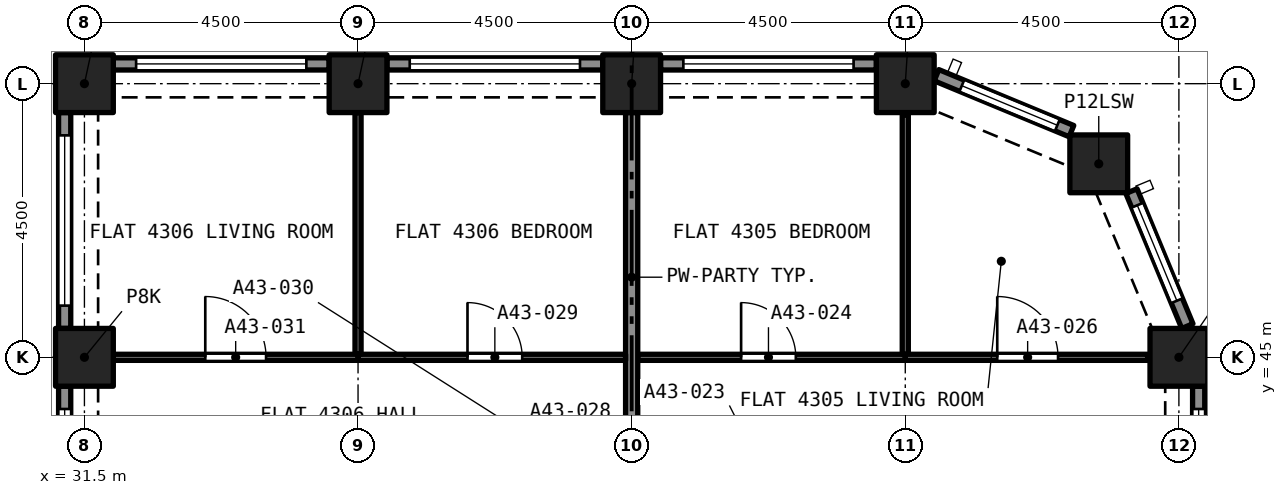
"""IFC4 building model, lengths in metres.
Left out: names, types, materials, properties, quantities, classifications, styles, units other than length and angle.
Written with IfcOpenShell. Run it as: python <this file> out.ifc"""

import sys

from ifc_helpers import new_model, si_unit, direction, frame, frame_2d, origin, origin_2d, place, context, subcontext, project, spatial, rectangle, extrude, element, fill, save


model = new_model("IFC4")
c1 = context("Model", 3, precision=1e-05, world=origin(), true_north=direction((0.0, 1.0)))
c2 = subcontext(c1, "Body", "Model", "MODEL_VIEW")
j1 = project(units=[si_unit("LENGTHUNIT", "METRE"), si_unit("PLANEANGLEUNIT", "RADIAN")], contexts=[c1])
p1 = place(None, origin())
s1 = spatial("IfcSite", under=j1, at=p1, CompositionType="ELEMENT")
p2 = place(p1, origin())
s2 = spatial("IfcBuilding", under=s1, at=p2, CompositionType="ELEMENT")
p3 = place(p2, frame((0.0, 0.0, 155.0)))
s3 = spatial("IfcBuildingStorey", under=s2, at=p3, CompositionType="ELEMENT", Elevation=155.0)
for number, where, z_axis, x_axis in (
    (1, (31.5, 45.0, 0.0), (0.0, 0.0, 1.0), (1.0, 0.0, 0.0)),
    (2, (49.5, 45.0, 0.0), (0.0, 0.0, 1.0), (1.0, 0.0, 0.0)),
    (3, (48.182, 48.182, 0.0), (0.0, 0.0, 1.0), (1.0, 0.0, 0.0)),
    (4, (31.5, 49.5, 0.0), (0.0, 0.0, 1.0), (1.0, 0.0, 0.0)),
    (5, (36.0, 49.5, 0.0), (0.0, 0.0, 1.0), (1.0, 0.0, 0.0)),
    (6, (40.5, 49.5, 0.0), (0.0, 0.0, 1.0), (1.0, 0.0, 0.0)),
    (7, (45.0, 49.5, 0.0), (0.0, 0.0, 1.0), (1.0, 0.0, 0.0)),
):
    element("IfcColumn", number, at=place(p3, frame(where, z_axis=z_axis, x_axis=x_axis)), inside=s3, PredefinedType="COLUMN", context=c2, shape_type="SweptSolid", body=[
        extrude(rectangle(XDim=0.95, YDim=0.95, at=origin_2d()), origin(), (0.0, 0.0, 1.0), 4.4),
    ])
p4 = place(p3, frame((49.825, 44.525, 0.0), z_axis=(0.0, 0.0, 1.0), x_axis=(0.0, -1.0, 0.0)))
e8 = element("IfcWall", 8, at=p4, inside=s3, PredefinedType="SOLIDWALL", context=c2, shape_type="SweptSolid", body=[
    extrude(rectangle(XDim=3.55, YDim=0.2, at=frame_2d((1.775, 0.0))), origin(), (0.0, 0.0, 1.0), 4.4),
])
p5 = place(p4, frame((0.375, 0.0, 0.45)))
e9 = element("IfcOpeningElement", 9, at=p5, cuts=e8, PredefinedType="OPENING", context=c2, shape_type="SweptSolid", body=[
    extrude(rectangle(XDim=2.8, YDim=2.55, at=frame_2d((1.4, 1.275))), frame((0.0, 0.11, 0.0), z_axis=(0.0, -1.0, 0.0), x_axis=(1.0, 0.0, 0.0)), (0.0, 0.0, 1.0), 0.22),
])
p6 = place(p3, frame((48.72, 47.733, 0.0), z_axis=(0.0, 0.0, 1.0), x_axis=(0.382680855588, -0.923880599843, 0.0)))
e10 = element("IfcWall", 10, at=p6, inside=s3, PredefinedType="SOLIDWALL", context=c2, shape_type="SweptSolid", body=[
    extrude(rectangle(XDim=2.403, YDim=0.2, at=frame_2d((1.201, 0.0))), origin(), (0.0, 0.0, 1.0), 4.4),
])
p7 = place(p6, frame((0.251, 0.0, 0.45)))
e11 = element("IfcOpeningElement", 11, at=p7, cuts=e10, PredefinedType="OPENING", context=c2, shape_type="SweptSolid", body=[
    extrude(rectangle(XDim=1.7, YDim=2.55, at=frame_2d((0.85, 1.275))), frame((0.0, 0.11, 0.0), z_axis=(0.0, -1.0, 0.0), x_axis=(1.0, 0.0, 0.0)), (0.0, 0.0, 1.0), 0.22),
])
p8 = place(p3, frame((45.513, 49.639, 0.0), z_axis=(0.0, 0.0, 1.0), x_axis=(0.923880599843, -0.382680855588, 0.0)))
e12 = element("IfcWall", 12, at=p8, inside=s3, PredefinedType="SOLIDWALL", context=c2, shape_type="SweptSolid", body=[
    extrude(rectangle(XDim=2.403, YDim=0.2, at=frame_2d((1.201, 0.0))), origin(), (0.0, 0.0, 1.0), 4.4),
])
p9 = place(p8, frame((0.451, 0.0, 0.45)))
e13 = element("IfcOpeningElement", 13, at=p9, cuts=e12, PredefinedType="OPENING", context=c2, shape_type="SweptSolid", body=[
    extrude(rectangle(XDim=1.7, YDim=2.55, at=frame_2d((0.85, 1.275))), frame((0.0, 0.11, 0.0), z_axis=(0.0, -1.0, 0.0), x_axis=(1.0, 0.0, 0.0)), (0.0, 0.0, 1.0), 0.22),
])
p10 = place(p3, frame((40.975, 49.825, 0.0), z_axis=(0.0, 0.0, 1.0), x_axis=(1.0, 0.0, 0.0)))
e14 = element("IfcWall", 14, at=p10, inside=s3, PredefinedType="SOLIDWALL", context=c2, shape_type="SweptSolid", body=[
    extrude(rectangle(XDim=3.55, YDim=0.2, at=frame_2d((1.775, 0.0))), origin(), (0.0, 0.0, 1.0), 4.4),
])
p11 = place(p10, frame((0.375, 0.0, 0.45)))
e15 = element("IfcOpeningElement", 15, at=p11, cuts=e14, PredefinedType="OPENING", context=c2, shape_type="SweptSolid", body=[
    extrude(rectangle(XDim=2.8, YDim=2.55, at=frame_2d((1.4, 1.275))), frame((0.0, 0.11, 0.0), z_axis=(0.0, -1.0, 0.0), x_axis=(1.0, 0.0, 0.0)), (0.0, 0.0, 1.0), 0.22),
])
p12 = place(p3, frame((36.475, 49.825, 0.0), z_axis=(0.0, 0.0, 1.0), x_axis=(1.0, 0.0, 0.0)))
e16 = element("IfcWall", 16, at=p12, inside=s3, PredefinedType="SOLIDWALL", context=c2, shape_type="SweptSolid", body=[
    extrude(rectangle(XDim=3.55, YDim=0.2, at=frame_2d((1.775, 0.0))), origin(), (0.0, 0.0, 1.0), 4.4),
])
p13 = place(p12, frame((0.375, 0.0, 0.45)))
e17 = element("IfcOpeningElement", 17, at=p13, cuts=e16, PredefinedType="OPENING", context=c2, shape_type="SweptSolid", body=[
    extrude(rectangle(XDim=2.8, YDim=2.55, at=frame_2d((1.4, 1.275))), frame((0.0, 0.11, 0.0), z_axis=(0.0, -1.0, 0.0), x_axis=(1.0, 0.0, 0.0)), (0.0, 0.0, 1.0), 0.22),
])
p14 = place(p3, frame((31.975, 49.825, 0.0), z_axis=(0.0, 0.0, 1.0), x_axis=(1.0, 0.0, 0.0)))
e18 = element("IfcWall", 18, at=p14, inside=s3, PredefinedType="SOLIDWALL", context=c2, shape_type="SweptSolid", body=[
    extrude(rectangle(XDim=3.55, YDim=0.2, at=frame_2d((1.775, 0.0))), origin(), (0.0, 0.0, 1.0), 4.4),
])
p15 = place(p14, frame((0.375, 0.0, 0.45)))
e19 = element("IfcOpeningElement", 19, at=p15, cuts=e18, PredefinedType="OPENING", context=c2, shape_type="SweptSolid", body=[
    extrude(rectangle(XDim=2.8, YDim=2.55, at=frame_2d((1.4, 1.275))), frame((0.0, 0.11, 0.0), z_axis=(0.0, -1.0, 0.0), x_axis=(1.0, 0.0, 0.0)), (0.0, 0.0, 1.0), 0.22),
])
p16 = place(p3, frame((31.175, 45.475, 0.0), z_axis=(0.0, 0.0, 1.0), x_axis=(0.0, 1.0, 0.0)))
e20 = element("IfcWall", 20, at=p16, inside=s3, PredefinedType="SOLIDWALL", context=c2, shape_type="SweptSolid", body=[
    extrude(rectangle(XDim=3.55, YDim=0.2, at=frame_2d((1.775, 0.0))), origin(), (0.0, 0.0, 1.0), 4.4),
])
p17 = place(p16, frame((0.375, 0.0, 0.45)))
e21 = element("IfcOpeningElement", 21, at=p17, cuts=e20, PredefinedType="OPENING", context=c2, shape_type="SweptSolid", body=[
    extrude(rectangle(XDim=2.8, YDim=2.55, at=frame_2d((1.4, 1.275))), frame((0.0, 0.11, 0.0), z_axis=(0.0, -1.0, 0.0), x_axis=(1.0, 0.0, 0.0)), (0.0, 0.0, 1.0), 0.22),
])
p18 = place(p3, frame((31.175, 40.975, 0.0), z_axis=(0.0, 0.0, 1.0), x_axis=(0.0, 1.0, 0.0)))
e22 = element("IfcWall", 22, at=p18, inside=s3, PredefinedType="SOLIDWALL", context=c2, shape_type="SweptSolid", body=[
    extrude(rectangle(XDim=3.55, YDim=0.2, at=frame_2d((1.775, 0.0))), origin(), (0.0, 0.0, 1.0), 4.4),
])
p19 = place(p18, frame((0.375, 0.0, 0.45)))
e23 = element("IfcOpeningElement", 23, at=p19, cuts=e22, PredefinedType="OPENING", context=c2, shape_type="SweptSolid", body=[
    extrude(rectangle(XDim=2.8, YDim=2.55, at=frame_2d((1.4, 1.275))), frame((0.0, 0.11, 0.0), z_axis=(0.0, -1.0, 0.0), x_axis=(1.0, 0.0, 0.0)), (0.0, 0.0, 1.0), 0.22),
])
p20 = place(p3, frame((40.6, 45.0, 0.0), z_axis=(0.0, 0.0, 1.0), x_axis=(1.0, 0.0, 0.0)))
e24 = element("IfcWall", 24, at=p20, inside=s3, PredefinedType="PARTITIONING", context=c2, shape_type="SweptSolid", body=[
    extrude(rectangle(XDim=4.4, YDim=0.1, at=frame_2d((2.2, 0.0))), origin(), (0.0, 0.0, 1.0), 4.1),
])
p21 = place(p20, frame((1.7, 0.0, 0.0)))
e25 = element("IfcOpeningElement", 25, at=p21, cuts=e24, PredefinedType="OPENING", context=c2, shape_type="SweptSolid", body=[
    extrude(rectangle(XDim=0.9, YDim=2.1, at=frame_2d((0.45, 1.05))), frame((0.0, 0.06, 0.0), z_axis=(0.0, -1.0, 0.0), x_axis=(1.0, 0.0, 0.0)), (0.0, 0.0, 1.0), 0.12),
])
p22 = place(p3, frame((45.0, 45.05, 0.0), z_axis=(0.0, 0.0, 1.0), x_axis=(0.0, 1.0, 0.0)))
e26 = element("IfcWall", 26, at=p22, inside=s3, PredefinedType="PARTITIONING", context=c2, shape_type="SweptSolid", body=[
    extrude(rectangle(XDim=3.936, YDim=0.1, at=frame_2d((1.968, 0.0))), origin(), (0.0, 0.0, 1.0), 4.1),
])
p23 = place(p3, frame((45.0, 45.0, 0.0), z_axis=(0.0, 0.0, 1.0), x_axis=(1.0, 0.0, 0.0)))
e27 = element("IfcWall", 27, at=p23, inside=s3, PredefinedType="PARTITIONING", context=c2, shape_type="SweptSolid", body=[
    extrude(rectangle(XDim=3.986, YDim=0.1, at=frame_2d((1.993, 0.0))), origin(), (0.0, 0.0, 1.0), 4.1),
])
p24 = place(p23, frame((1.512, 0.0, 0.0)))
e28 = element("IfcOpeningElement", 28, at=p24, cuts=e27, PredefinedType="OPENING", context=c2, shape_type="SweptSolid", body=[
    extrude(rectangle(XDim=1.0, YDim=2.1, at=frame_2d((0.5, 1.05))), frame((0.0, 0.06, 0.0), z_axis=(0.0, -1.0, 0.0), x_axis=(1.0, 0.0, 0.0)), (0.0, 0.0, 1.0), 0.12),
])
p25 = place(p3, frame((40.5, 43.61, 0.0), z_axis=(0.0, 0.0, 1.0), x_axis=(0.0, 1.0, 0.0)))
e29 = element("IfcWall", 29, at=p25, inside=s3, PredefinedType="PARTITIONING", context=c2, shape_type="SweptSolid", body=[
    extrude(rectangle(XDim=5.415, YDim=0.2, at=frame_2d((2.708, 0.0))), origin(), (0.0, 0.0, 1.0), 4.1),
])
p26 = place(p3, frame((36.0, 45.0, 0.0), z_axis=(0.0, 0.0, 1.0), x_axis=(1.0, 0.0, 0.0)))
e30 = element("IfcWall", 30, at=p26, inside=s3, PredefinedType="PARTITIONING", context=c2, shape_type="SweptSolid", body=[
    extrude(rectangle(XDim=4.4, YDim=0.1, at=frame_2d((2.2, 0.0))), origin(), (0.0, 0.0, 1.0), 4.1),
])
p27 = place(p26, frame((1.8, 0.0, 0.0)))
e31 = element("IfcOpeningElement", 31, at=p27, cuts=e30, PredefinedType="OPENING", context=c2, shape_type="SweptSolid", body=[
    extrude(rectangle(XDim=0.9, YDim=2.1, at=frame_2d((0.45, 1.05))), frame((0.0, 0.06, 0.0), z_axis=(0.0, -1.0, 0.0), x_axis=(1.0, 0.0, 0.0)), (0.0, 0.0, 1.0), 0.12),
])
p28 = place(p3, frame((36.0, 45.05, 0.0), z_axis=(0.0, 0.0, 1.0), x_axis=(0.0, 1.0, 0.0)))
e32 = element("IfcWall", 32, at=p28, inside=s3, PredefinedType="PARTITIONING", context=c2, shape_type="SweptSolid", body=[
    extrude(rectangle(XDim=3.975, YDim=0.1, at=frame_2d((1.987, 0.0))), origin(), (0.0, 0.0, 1.0), 4.1),
])
p29 = place(p3, frame((31.975, 45.0, 0.0), z_axis=(0.0, 0.0, 1.0), x_axis=(1.0, 0.0, 0.0)))
e33 = element("IfcWall", 33, at=p29, inside=s3, PredefinedType="PARTITIONING", context=c2, shape_type="SweptSolid", body=[
    extrude(rectangle(XDim=4.025, YDim=0.1, at=frame_2d((2.012, 0.0))), origin(), (0.0, 0.0, 1.0), 4.1),
])
p30 = place(p29, frame((1.512, 0.0, 0.0)))
e34 = element("IfcOpeningElement", 34, at=p30, cuts=e33, PredefinedType="OPENING", context=c2, shape_type="SweptSolid", body=[
    extrude(rectangle(XDim=1.0, YDim=2.1, at=frame_2d((0.5, 1.05))), frame((0.0, 0.06, 0.0), z_axis=(0.0, -1.0, 0.0), x_axis=(1.0, 0.0, 0.0)), (0.0, 0.0, 1.0), 0.12),
])
p31 = place(p5, origin())
e35 = element("IfcWindow", 35, at=p31, inside=s3, PartitioningType="SINGLE_PANEL", PredefinedType="WINDOW", context=c2, shape_type="SweptSolid", body=[
    extrude(rectangle(XDim=2.8, YDim=2.55, at=frame_2d((1.4, 1.275))), frame((0.0, 0.03, 0.0), z_axis=(0.0, -1.0, 0.0), x_axis=(1.0, 0.0, 0.0)), (0.0, 0.0, 1.0), 0.06),
])
fill(e9, e35)
p32 = place(p7, origin())
e36 = element("IfcWindow", 36, at=p32, inside=s3, PartitioningType="SINGLE_PANEL", PredefinedType="WINDOW", context=c2, shape_type="SweptSolid", body=[
    extrude(rectangle(XDim=1.7, YDim=2.55, at=frame_2d((0.85, 1.275))), frame((0.0, 0.03, 0.0), z_axis=(0.0, -1.0, 0.0), x_axis=(1.0, 0.0, 0.0)), (0.0, 0.0, 1.0), 0.06),
])
fill(e11, e36)
p33 = place(p9, origin())
e37 = element("IfcWindow", 37, at=p33, inside=s3, PartitioningType="SINGLE_PANEL", PredefinedType="WINDOW", context=c2, shape_type="SweptSolid", body=[
    extrude(rectangle(XDim=1.7, YDim=2.55, at=frame_2d((0.85, 1.275))), frame((0.0, 0.03, 0.0), z_axis=(0.0, -1.0, 0.0), x_axis=(1.0, 0.0, 0.0)), (0.0, 0.0, 1.0), 0.06),
])
fill(e13, e37)
p34 = place(p11, origin())
e38 = element("IfcWindow", 38, at=p34, inside=s3, PartitioningType="SINGLE_PANEL", PredefinedType="WINDOW", context=c2, shape_type="SweptSolid", body=[
    extrude(rectangle(XDim=2.8, YDim=2.55, at=frame_2d((1.4, 1.275))), frame((0.0, 0.03, 0.0), z_axis=(0.0, -1.0, 0.0), x_axis=(1.0, 0.0, 0.0)), (0.0, 0.0, 1.0), 0.06),
])
fill(e15, e38)
p35 = place(p13, origin())
e39 = element("IfcWindow", 39, at=p35, inside=s3, PartitioningType="SINGLE_PANEL", PredefinedType="WINDOW", context=c2, shape_type="SweptSolid", body=[
    extrude(rectangle(XDim=2.8, YDim=2.55, at=frame_2d((1.4, 1.275))), frame((0.0, 0.03, 0.0), z_axis=(0.0, -1.0, 0.0), x_axis=(1.0, 0.0, 0.0)), (0.0, 0.0, 1.0), 0.06),
])
fill(e17, e39)
p36 = place(p15, origin())
e40 = element("IfcWindow", 40, at=p36, inside=s3, PartitioningType="SINGLE_PANEL", PredefinedType="WINDOW", context=c2, shape_type="SweptSolid", body=[
    extrude(rectangle(XDim=2.8, YDim=2.55, at=frame_2d((1.4, 1.275))), frame((0.0, 0.03, 0.0), z_axis=(0.0, -1.0, 0.0), x_axis=(1.0, 0.0, 0.0)), (0.0, 0.0, 1.0), 0.06),
])
fill(e19, e40)
p37 = place(p17, origin())
e41 = element("IfcWindow", 41, at=p37, inside=s3, PartitioningType="SINGLE_PANEL", PredefinedType="WINDOW", context=c2, shape_type="SweptSolid", body=[
    extrude(rectangle(XDim=2.8, YDim=2.55, at=frame_2d((1.4, 1.275))), frame((0.0, 0.03, 0.0), z_axis=(0.0, -1.0, 0.0), x_axis=(1.0, 0.0, 0.0)), (0.0, 0.0, 1.0), 0.06),
])
fill(e21, e41)
p38 = place(p19, origin())
e42 = element("IfcWindow", 42, at=p38, inside=s3, PartitioningType="SINGLE_PANEL", PredefinedType="WINDOW", context=c2, shape_type="SweptSolid", body=[
    extrude(rectangle(XDim=2.8, YDim=2.55, at=frame_2d((1.4, 1.275))), frame((0.0, 0.03, 0.0), z_axis=(0.0, -1.0, 0.0), x_axis=(1.0, 0.0, 0.0)), (0.0, 0.0, 1.0), 0.06),
])
fill(e23, e42)
p39 = place(p21, origin())
e43 = element("IfcDoor", 43, at=p39, inside=s3, OperationType="SINGLE_SWING_LEFT", PredefinedType="DOOR", context=c2, shape_type="SweptSolid", body=[
    extrude(rectangle(XDim=0.9, YDim=2.1, at=frame_2d((0.45, 1.05))), frame((0.0, 0.025, 0.0), z_axis=(0.0, -1.0, 0.0), x_axis=(1.0, 0.0, 0.0)), (0.0, 0.0, 1.0), 0.05),
])
fill(e25, e43)
p40 = place(p24, origin())
e44 = element("IfcDoor", 44, at=p40, inside=s3, OperationType="SINGLE_SWING_RIGHT", PredefinedType="DOOR", context=c2, shape_type="SweptSolid", body=[
    extrude(rectangle(XDim=1.0, YDim=2.1, at=frame_2d((0.5, 1.05))), frame((0.0, 0.025, 0.0), z_axis=(0.0, -1.0, 0.0), x_axis=(1.0, 0.0, 0.0)), (0.0, 0.0, 1.0), 0.05),
])
fill(e28, e44)
p41 = place(p27, origin())
e45 = element("IfcDoor", 45, at=p41, inside=s3, OperationType="SINGLE_SWING_RIGHT", PredefinedType="DOOR", context=c2, shape_type="SweptSolid", body=[
    extrude(rectangle(XDim=0.9, YDim=2.1, at=frame_2d((0.45, 1.05))), frame((0.0, 0.025, 0.0), z_axis=(0.0, -1.0, 0.0), x_axis=(1.0, 0.0, 0.0)), (0.0, 0.0, 1.0), 0.05),
])
fill(e31, e45)
p42 = place(p30, origin())
e46 = element("IfcDoor", 46, at=p42, inside=s3, OperationType="SINGLE_SWING_LEFT", PredefinedType="DOOR", context=c2, shape_type="SweptSolid", body=[
    extrude(rectangle(XDim=1.0, YDim=2.1, at=frame_2d((0.5, 1.05))), frame((0.0, 0.025, 0.0), z_axis=(0.0, -1.0, 0.0), x_axis=(1.0, 0.0, 0.0)), (0.0, 0.0, 1.0), 0.05),
])
fill(e34, e46)
save(model, sys.argv[1])
